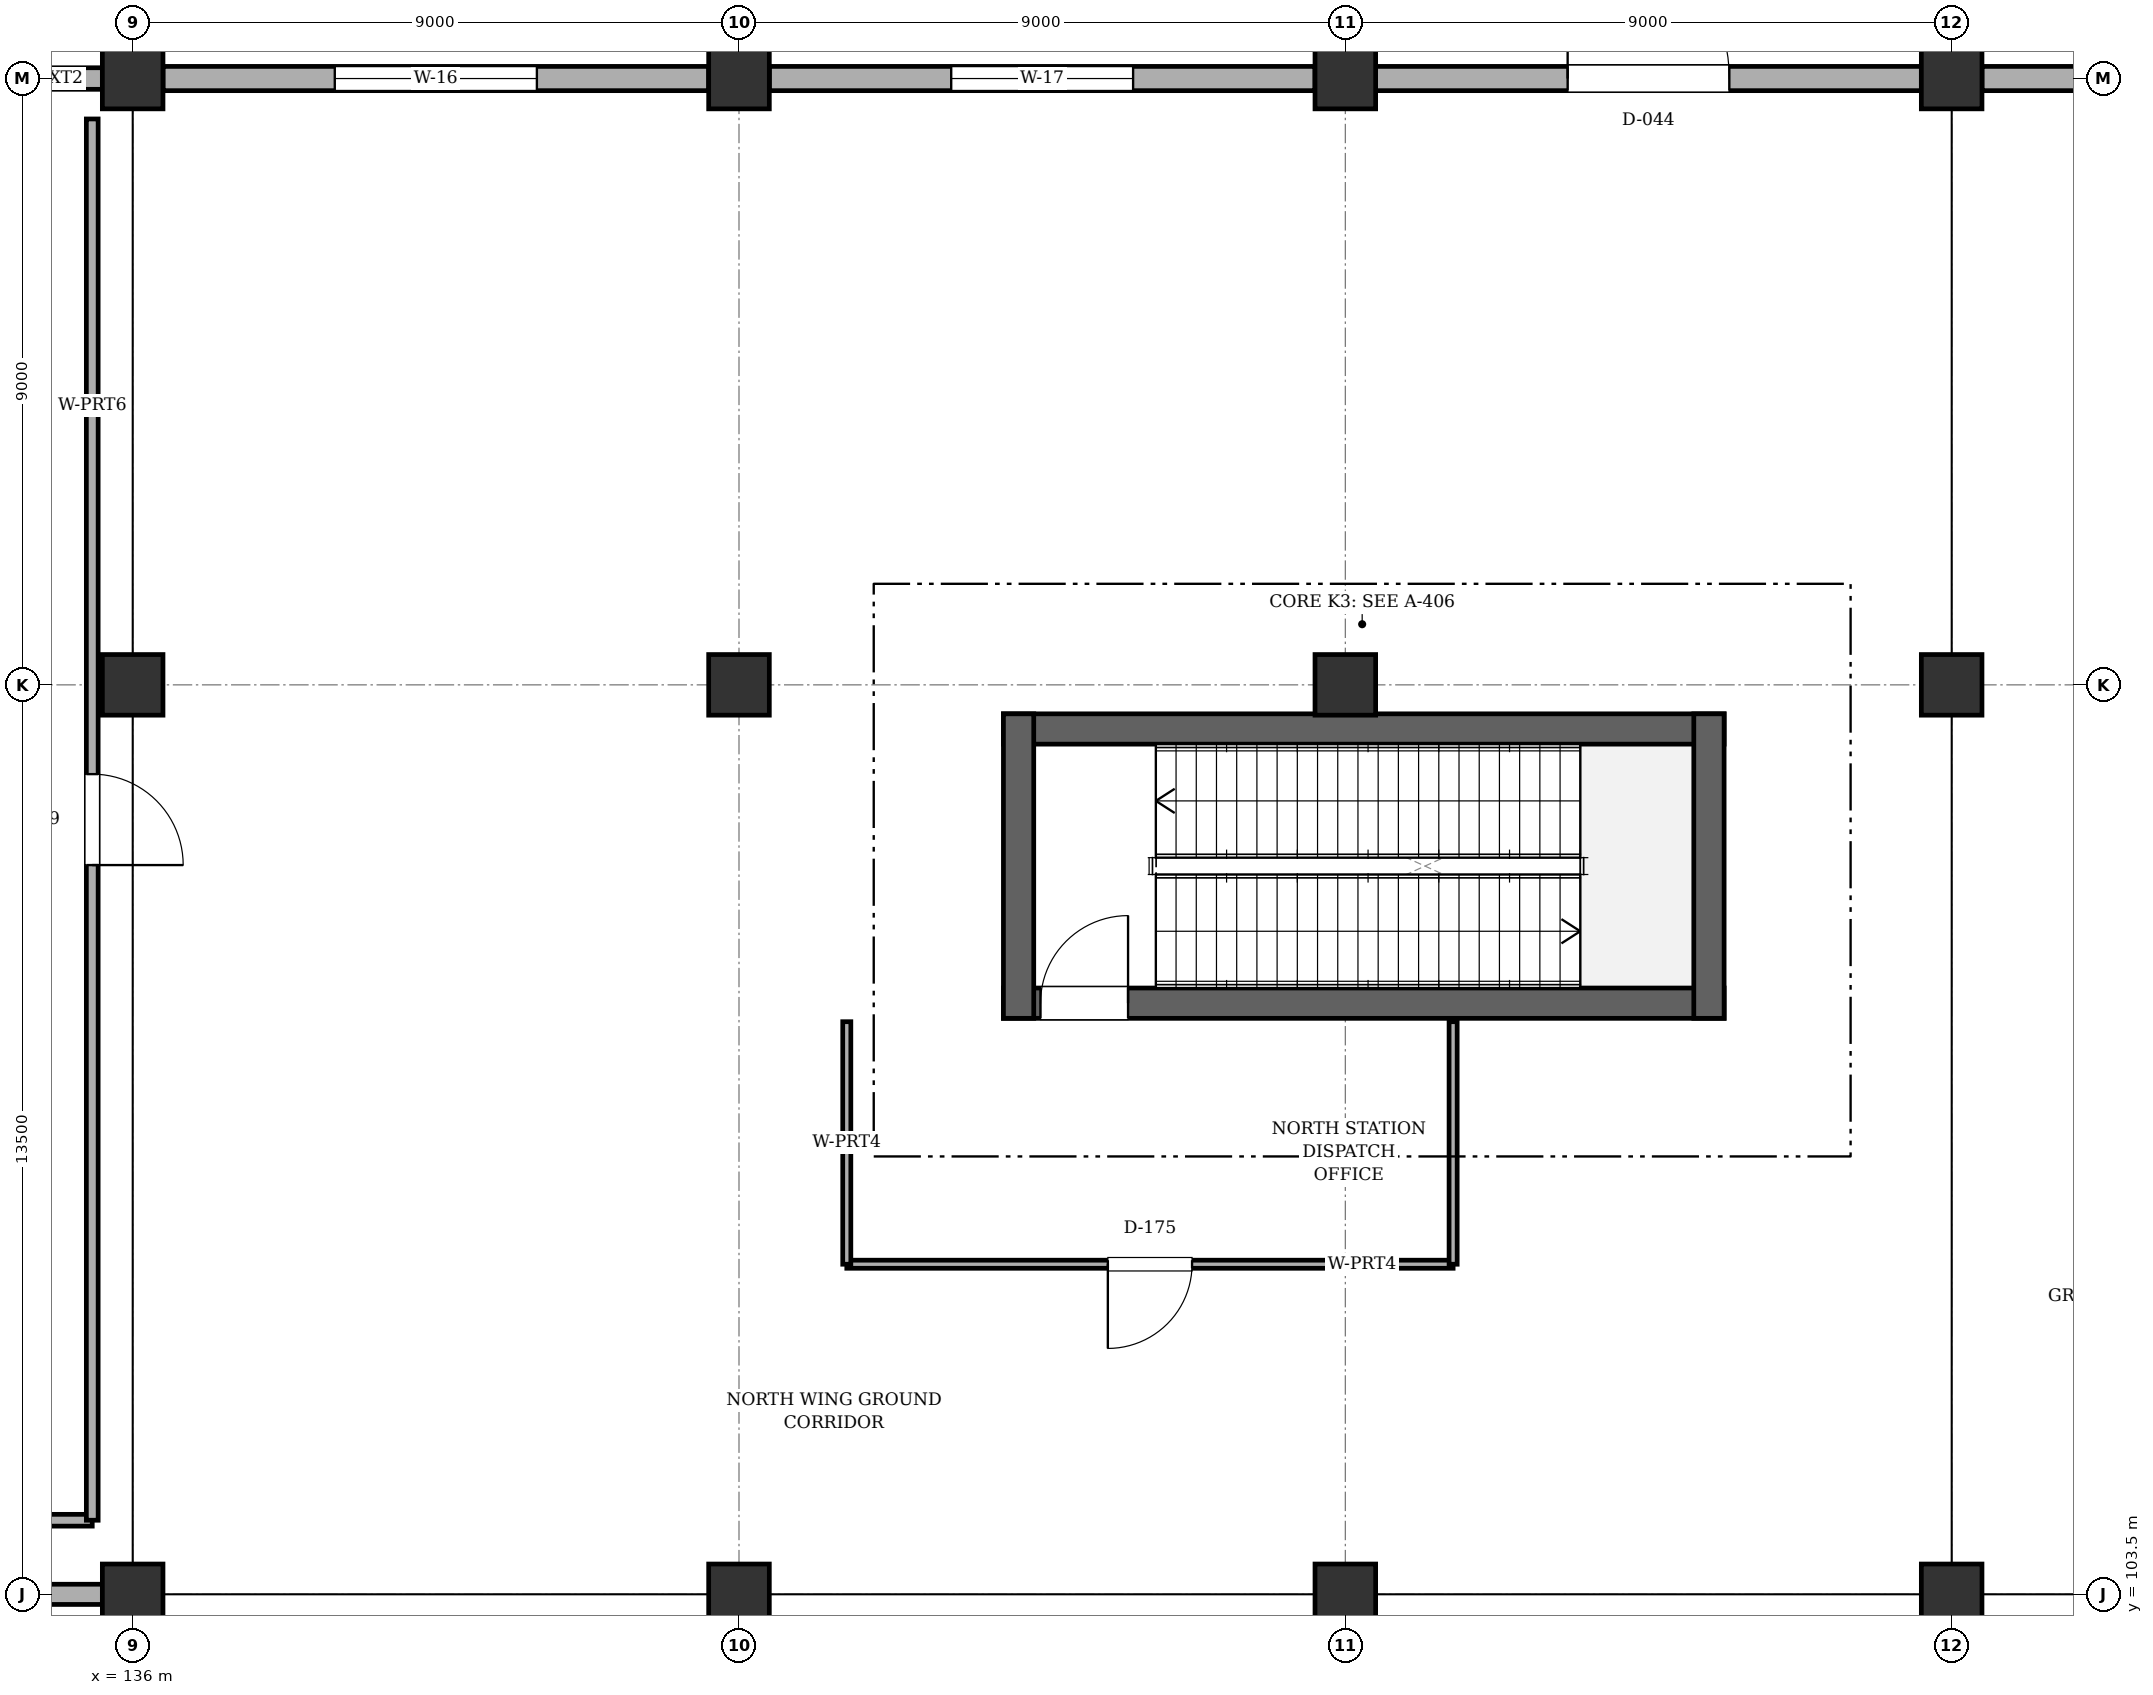
"""IFC4 building model, lengths in metres.
Left out: names, types, materials, properties, quantities, classifications, styles, units other than length and angle.
Written with IfcOpenShell. Run it as: python <this file> out.ifc"""

import sys

from ifc_helpers import new_model, si_unit, direction, frame, frame_2d, origin, origin_2d, place, context, subcontext, project, spatial, rectangle, extrude, element, fill, save


model = new_model("IFC4")
c1 = context("Model", 3, precision=1e-05, world=origin(), true_north=direction((0.0, 1.0)))
c2 = subcontext(c1, "Body", "Model", "MODEL_VIEW")
j1 = project(units=[si_unit("LENGTHUNIT", "METRE"), si_unit("PLANEANGLEUNIT", "RADIAN")], contexts=[c1])
p1 = place(None, origin())
s1 = spatial("IfcSite", under=j1, at=p1, CompositionType="ELEMENT")
p2 = place(p1, origin())
s2 = spatial("IfcBuilding", under=s1, at=p2, CompositionType="ELEMENT")
p3 = place(p2, origin())
s3 = spatial("IfcBuildingStorey", under=s2, at=p3, CompositionType="ELEMENT", Elevation=0.0)
for number, where, z_axis, x_axis in (
    (1, (136.0, 103.5, 0.0), (0.0, 0.0, 1.0), (1.0, 0.0, 0.0)),
    (2, (136.0, 117.0, 0.0), (0.0, 0.0, 1.0), (1.0, 0.0, 0.0)),
    (3, (136.0, 126.0, 0.0), (0.0, 0.0, 1.0), (1.0, 0.0, 0.0)),
    (4, (145.0, 103.5, 0.0), (0.0, 0.0, 1.0), (1.0, 0.0, 0.0)),
    (5, (145.0, 117.0, 0.0), (0.0, 0.0, 1.0), (1.0, 0.0, 0.0)),
    (6, (145.0, 126.0, 0.0), (0.0, 0.0, 1.0), (1.0, 0.0, 0.0)),
    (7, (154.0, 103.5, 0.0), (0.0, 0.0, 1.0), (1.0, 0.0, 0.0)),
    (8, (154.0, 117.0, 0.0), (0.0, 0.0, 1.0), (1.0, 0.0, 0.0)),
    (9, (154.0, 126.0, 0.0), (0.0, 0.0, 1.0), (1.0, 0.0, 0.0)),
    (10, (163.0, 103.5, 0.0), (0.0, 0.0, 1.0), (1.0, 0.0, 0.0)),
    (11, (163.0, 117.0, 0.0), (0.0, 0.0, 1.0), (1.0, 0.0, 0.0)),
    (12, (163.0, 126.0, 0.0), (0.0, 0.0, 1.0), (1.0, 0.0, 0.0)),
):
    element("IfcColumn", number, at=place(p3, frame(where, z_axis=z_axis, x_axis=x_axis)), inside=s3, PredefinedType="COLUMN", context=c2, shape_type="SweptSolid", body=[
        extrude(rectangle(XDim=0.9, YDim=0.9, at=origin_2d()), origin(), (0.0, 0.0, 1.0), 6.6),
    ])
p4 = place(p3, frame((126.45, 126.0, 0.0), z_axis=(0.0, 0.0, 1.0), x_axis=(1.0, 0.0, 0.0)))
e13 = element("IfcWall", 13, at=p4, inside=s3, PredefinedType="SOLIDWALL", context=c2, shape_type="SweptSolid", body=[
    extrude(rectangle(XDim=9.1, YDim=0.32, at=frame_2d((4.55, 0.0))), origin(), (0.0, 0.0, 1.0), 5.855),
])
p5 = place(p4, frame((3.35, 0.0, 0.0)))
e14 = element("IfcOpeningElement", 14, at=p5, cuts=e13, PredefinedType="OPENING", context=c2, shape_type="SweptSolid", body=[
    extrude(rectangle(XDim=2.4, YDim=2.5, at=frame_2d((1.2, 1.25))), frame((0.0, 0.17, 0.0), z_axis=(0.0, -1.0, 0.0), x_axis=(1.0, 0.0, 0.0)), (0.0, 0.0, 1.0), 0.34),
])
p6 = place(p3, frame((135.55, 103.5, 0.0), z_axis=(0.0, 0.0, 1.0), x_axis=(-1.0, 0.0, 0.0)))
e15 = element("IfcWall", 15, at=p6, inside=s3, PredefinedType="SOLIDWALL", context=c2, shape_type="SweptSolid", body=[
    extrude(rectangle(XDim=8.75, YDim=0.3, at=frame_2d((4.375, 0.0))), origin(), (0.0, 0.0, 1.0), 5.495),
])
p7 = place(p6, frame((3.2, 0.0, 0.95)))
e16 = element("IfcOpeningElement", 16, at=p7, cuts=e15, PredefinedType="OPENING", context=c2, shape_type="SweptSolid", body=[
    extrude(rectangle(XDim=2.7, YDim=2.1, at=frame_2d((1.35, 1.05))), frame((0.0, 0.16, 0.0), z_axis=(0.0, -1.0, 0.0), x_axis=(1.0, 0.0, 0.0)), (0.0, 0.0, 1.0), 0.32),
])
p8 = place(p3, frame((136.45, 126.0, 0.0), z_axis=(0.0, 0.0, 1.0), x_axis=(1.0, 0.0, 0.0)))
e17 = element("IfcWall", 17, at=p8, inside=s3, PredefinedType="SOLIDWALL", context=c2, shape_type="SweptSolid", body=[
    extrude(rectangle(XDim=8.1, YDim=0.36, at=frame_2d((4.05, 0.0))), origin(), (0.0, 0.0, 1.0), 5.855),
])
p9 = place(p8, frame((2.55, 0.0, 0.95)))
e18 = element("IfcOpeningElement", 18, at=p9, cuts=e17, PredefinedType="OPENING", context=c2, shape_type="SweptSolid", body=[
    extrude(rectangle(XDim=3.0, YDim=2.1, at=frame_2d((1.5, 1.05))), frame((0.0, 0.19, 0.0), z_axis=(0.0, -1.0, 0.0), x_axis=(1.0, 0.0, 0.0)), (0.0, 0.0, 1.0), 0.38),
])
p10 = place(p3, frame((145.45, 126.0, 0.0), z_axis=(0.0, 0.0, 1.0), x_axis=(1.0, 0.0, 0.0)))
e19 = element("IfcWall", 19, at=p10, inside=s3, PredefinedType="SOLIDWALL", context=c2, shape_type="SweptSolid", body=[
    extrude(rectangle(XDim=8.1, YDim=0.36, at=frame_2d((4.05, 0.0))), origin(), (0.0, 0.0, 1.0), 5.855),
])
p11 = place(p10, frame((2.7, 0.0, 0.95)))
e20 = element("IfcOpeningElement", 20, at=p11, cuts=e19, PredefinedType="OPENING", context=c2, shape_type="SweptSolid", body=[
    extrude(rectangle(XDim=2.7, YDim=2.1, at=frame_2d((1.35, 1.05))), frame((0.0, 0.19, 0.0), z_axis=(0.0, -1.0, 0.0), x_axis=(1.0, 0.0, 0.0)), (0.0, 0.0, 1.0), 0.38),
])
p12 = place(p3, frame((154.45, 126.0, 0.0), z_axis=(0.0, 0.0, 1.0), x_axis=(1.0, 0.0, 0.0)))
e21 = element("IfcWall", 21, at=p12, inside=s3, PredefinedType="SOLIDWALL", context=c2, shape_type="SweptSolid", body=[
    extrude(rectangle(XDim=8.1, YDim=0.36, at=frame_2d((4.05, 0.0))), origin(), (0.0, 0.0, 1.0), 5.875),
])
p13 = place(p12, frame((2.85, 0.0, 0.0)))
e22 = element("IfcOpeningElement", 22, at=p13, cuts=e21, PredefinedType="OPENING", context=c2, shape_type="SweptSolid", body=[
    extrude(rectangle(XDim=2.4, YDim=2.5, at=frame_2d((1.2, 1.25))), frame((0.0, 0.19, 0.0), z_axis=(0.0, -1.0, 0.0), x_axis=(1.0, 0.0, 0.0)), (0.0, 0.0, 1.0), 0.38),
])
p14 = place(p3, frame((163.45, 126.0, 0.0), z_axis=(0.0, 0.0, 1.0), x_axis=(1.0, 0.0, 0.0)))
e23 = element("IfcWall", 23, at=p14, inside=s3, PredefinedType="SOLIDWALL", context=c2, shape_type="SweptSolid", body=[
    extrude(rectangle(XDim=8.1, YDim=0.36, at=frame_2d((4.05, 0.0))), origin(), (0.0, 0.0, 1.0), 5.875),
])
p15 = place(p14, frame((2.85, 0.0, 0.0)))
e24 = element("IfcOpeningElement", 24, at=p15, cuts=e23, PredefinedType="OPENING", context=c2, shape_type="SweptSolid", body=[
    extrude(rectangle(XDim=2.4, YDim=2.5, at=frame_2d((1.2, 1.25))), frame((0.0, 0.19, 0.0), z_axis=(0.0, -1.0, 0.0), x_axis=(1.0, 0.0, 0.0)), (0.0, 0.0, 1.0), 0.38),
])
p16 = place(p3, frame((148.925, 112.275, 0.0), z_axis=(0.0, 0.0, 1.0), x_axis=(1.0, 0.0, 0.0)))
e25 = element("IfcWall", 25, at=p16, inside=s3, PredefinedType="SHEAR", context=c2, shape_type="SweptSolid", body=[
    extrude(rectangle(XDim=10.698, YDim=0.45, at=frame_2d((5.349, 0.0))), origin(), (0.0, 0.0, 1.0), 6.36),
])
p17 = place(p16, frame((0.55, 0.0, 0.0)))
e26 = element("IfcOpeningElement", 26, at=p17, cuts=e25, PredefinedType="OPENING", context=c2, shape_type="SweptSolid", body=[
    extrude(rectangle(XDim=1.3, YDim=2.1, at=frame_2d((0.65, 1.05))), frame((0.0, 0.235, 0.0), z_axis=(0.0, -1.0, 0.0), x_axis=(1.0, 0.0, 0.0)), (0.0, 0.0, 1.0), 0.47),
])
p18 = place(p3, frame((159.623, 116.345, 0.0), z_axis=(0.0, 0.0, 1.0), x_axis=(-1.0, 0.0, 0.0)))
e27 = element("IfcWall", 27, at=p18, inside=s3, PredefinedType="SHEAR", context=c2, shape_type="SweptSolid", body=[
    extrude(rectangle(XDim=10.698, YDim=0.45, at=frame_2d((5.349, 0.0))), origin(), (0.0, 0.0, 1.0), 6.36),
])
for number, where, z_axis, x_axis in (
    (28, (159.397, 112.05, 0.0), (0.0, 0.0, 1.0), (0.0, 1.0, 0.0)),
    (29, (149.15, 116.57, 0.0), (0.0, 0.0, 1.0), (0.0, -1.0, 0.0)),
):
    element("IfcWall", number, at=place(p3, frame(where, z_axis=z_axis, x_axis=x_axis)), inside=s3, PredefinedType="SHEAR", context=c2, shape_type="SweptSolid", body=[
        extrude(rectangle(XDim=4.52, YDim=0.45, at=frame_2d((2.26, 0.0))), origin(), (0.0, 0.0, 1.0), 6.36),
    ])
p19 = place(p3, frame((135.4, 104.6, 0.0), z_axis=(0.0, 0.0, 1.0), x_axis=(-1.0, 0.0, 0.0)))
e30 = element("IfcWall", 30, at=p19, inside=s3, PredefinedType="PARTITIONING", context=c2, shape_type="SweptSolid", body=[
    extrude(rectangle(XDim=27.0, YDim=0.175, at=frame_2d((13.5, 0.0))), origin(), (0.0, 0.0, 1.0), 4.4),
])
p20 = place(p3, frame((135.4, 125.4, 0.0), z_axis=(0.0, 0.0, 1.0), x_axis=(0.0, -1.0, 0.0)))
e31 = element("IfcWall", 31, at=p20, inside=s3, PredefinedType="PARTITIONING", context=c2, shape_type="SweptSolid", body=[
    extrude(rectangle(XDim=20.8, YDim=0.175, at=frame_2d((10.4, 0.0))), origin(), (0.0, 0.0, 1.0), 4.4),
])
p21 = place(p20, frame((9.725, 0.0, 0.0)))
e32 = element("IfcOpeningElement", 32, at=p21, cuts=e31, PredefinedType="OPENING", context=c2, shape_type="SweptSolid", body=[
    extrude(rectangle(XDim=1.35, YDim=2.1, at=frame_2d((0.675, 1.05))), frame((0.0, 0.097, 0.0), z_axis=(0.0, -1.0, 0.0), x_axis=(1.0, 0.0, 0.0)), (0.0, 0.0, 1.0), 0.195),
])
p22 = place(p3, frame((155.6, 108.4, 0.0), z_axis=(0.0, 0.0, 1.0), x_axis=(-1.0, 0.0, 0.0)))
e33 = element("IfcWall", 33, at=p22, inside=s3, PredefinedType="PARTITIONING", context=c2, shape_type="SweptSolid", body=[
    extrude(rectangle(XDim=9.0, YDim=0.12, at=frame_2d((4.5, 0.0))), origin(), (0.0, 0.0, 1.0), 4.4),
])
p23 = place(p22, frame((3.875, 0.0, 0.0)))
e34 = element("IfcOpeningElement", 34, at=p23, cuts=e33, PredefinedType="OPENING", context=c2, shape_type="SweptSolid", body=[
    extrude(rectangle(XDim=1.25, YDim=2.1, at=frame_2d((0.625, 1.05))), frame((0.0, 0.07, 0.0), z_axis=(0.0, -1.0, 0.0), x_axis=(1.0, 0.0, 0.0)), (0.0, 0.0, 1.0), 0.14),
])
for number, where, z_axis, x_axis in (
    (35, (146.6, 108.4, 0.0), (0.0, 0.0, 1.0), (0.0, 1.0, 0.0)),
    (36, (155.6, 112.0, 0.0), (0.0, 0.0, 1.0), (0.0, -1.0, 0.0)),
):
    element("IfcWall", number, at=place(p3, frame(where, z_axis=z_axis, x_axis=x_axis)), inside=s3, PredefinedType="PARTITIONING", context=c2, shape_type="SweptSolid", body=[
        extrude(rectangle(XDim=3.6, YDim=0.12, at=frame_2d((1.8, 0.0))), origin(), (0.0, 0.0, 1.0), 4.4),
    ])
p24 = place(p9, origin())
e37 = element("IfcWindow", 37, at=p24, inside=s3, PartitioningType="SINGLE_PANEL", PredefinedType="WINDOW", context=c2, shape_type="SweptSolid", body=[
    extrude(rectangle(XDim=3.0, YDim=2.1, at=frame_2d((1.5, 1.05))), frame((0.0, 0.03, 0.0), z_axis=(0.0, -1.0, 0.0), x_axis=(1.0, 0.0, 0.0)), (0.0, 0.0, 1.0), 0.06),
])
fill(e18, e37)
p25 = place(p11, origin())
e38 = element("IfcWindow", 38, at=p25, inside=s3, PartitioningType="SINGLE_PANEL", PredefinedType="WINDOW", context=c2, shape_type="SweptSolid", body=[
    extrude(rectangle(XDim=2.7, YDim=2.1, at=frame_2d((1.35, 1.05))), frame((0.0, 0.03, 0.0), z_axis=(0.0, -1.0, 0.0), x_axis=(1.0, 0.0, 0.0)), (0.0, 0.0, 1.0), 0.06),
])
fill(e20, e38)
p26 = place(p13, origin())
e39 = element("IfcDoor", 39, at=p26, inside=s3, OperationType="SINGLE_SWING_LEFT", PredefinedType="DOOR", context=c2, shape_type="SweptSolid", body=[
    extrude(rectangle(XDim=2.4, YDim=2.5, at=frame_2d((1.2, 1.25))), frame((0.0, 0.025, 0.0), z_axis=(0.0, -1.0, 0.0), x_axis=(1.0, 0.0, 0.0)), (0.0, 0.0, 1.0), 0.05),
])
fill(e22, e39)
p27 = place(p17, origin())
e40 = element("IfcDoor", 40, at=p27, inside=s3, OperationType="SINGLE_SWING_RIGHT", PredefinedType="DOOR", context=c2, shape_type="SweptSolid", body=[
    extrude(rectangle(XDim=1.3, YDim=2.1, at=frame_2d((0.65, 1.05))), frame((0.0, 0.025, 0.0), z_axis=(0.0, -1.0, 0.0), x_axis=(1.0, 0.0, 0.0)), (0.0, 0.0, 1.0), 0.05),
])
fill(e26, e40)
p28 = place(p21, origin())
e41 = element("IfcDoor", 41, at=p28, inside=s3, OperationType="SINGLE_SWING_RIGHT", PredefinedType="DOOR", context=c2, shape_type="SweptSolid", body=[
    extrude(rectangle(XDim=1.35, YDim=2.1, at=frame_2d((0.675, 1.05))), frame((0.0, 0.025, 0.0), z_axis=(0.0, -1.0, 0.0), x_axis=(1.0, 0.0, 0.0)), (0.0, 0.0, 1.0), 0.05),
])
fill(e32, e41)
p29 = place(p23, origin())
e42 = element("IfcDoor", 42, at=p29, inside=s3, OperationType="SINGLE_SWING_RIGHT", PredefinedType="DOOR", context=c2, shape_type="SweptSolid", body=[
    extrude(rectangle(XDim=1.25, YDim=2.1, at=frame_2d((0.625, 1.05))), frame((0.0, 0.025, 0.0), z_axis=(0.0, -1.0, 0.0), x_axis=(1.0, 0.0, 0.0)), (0.0, 0.0, 1.0), 0.05),
])
fill(e34, e42)
save(model, sys.argv[1])
